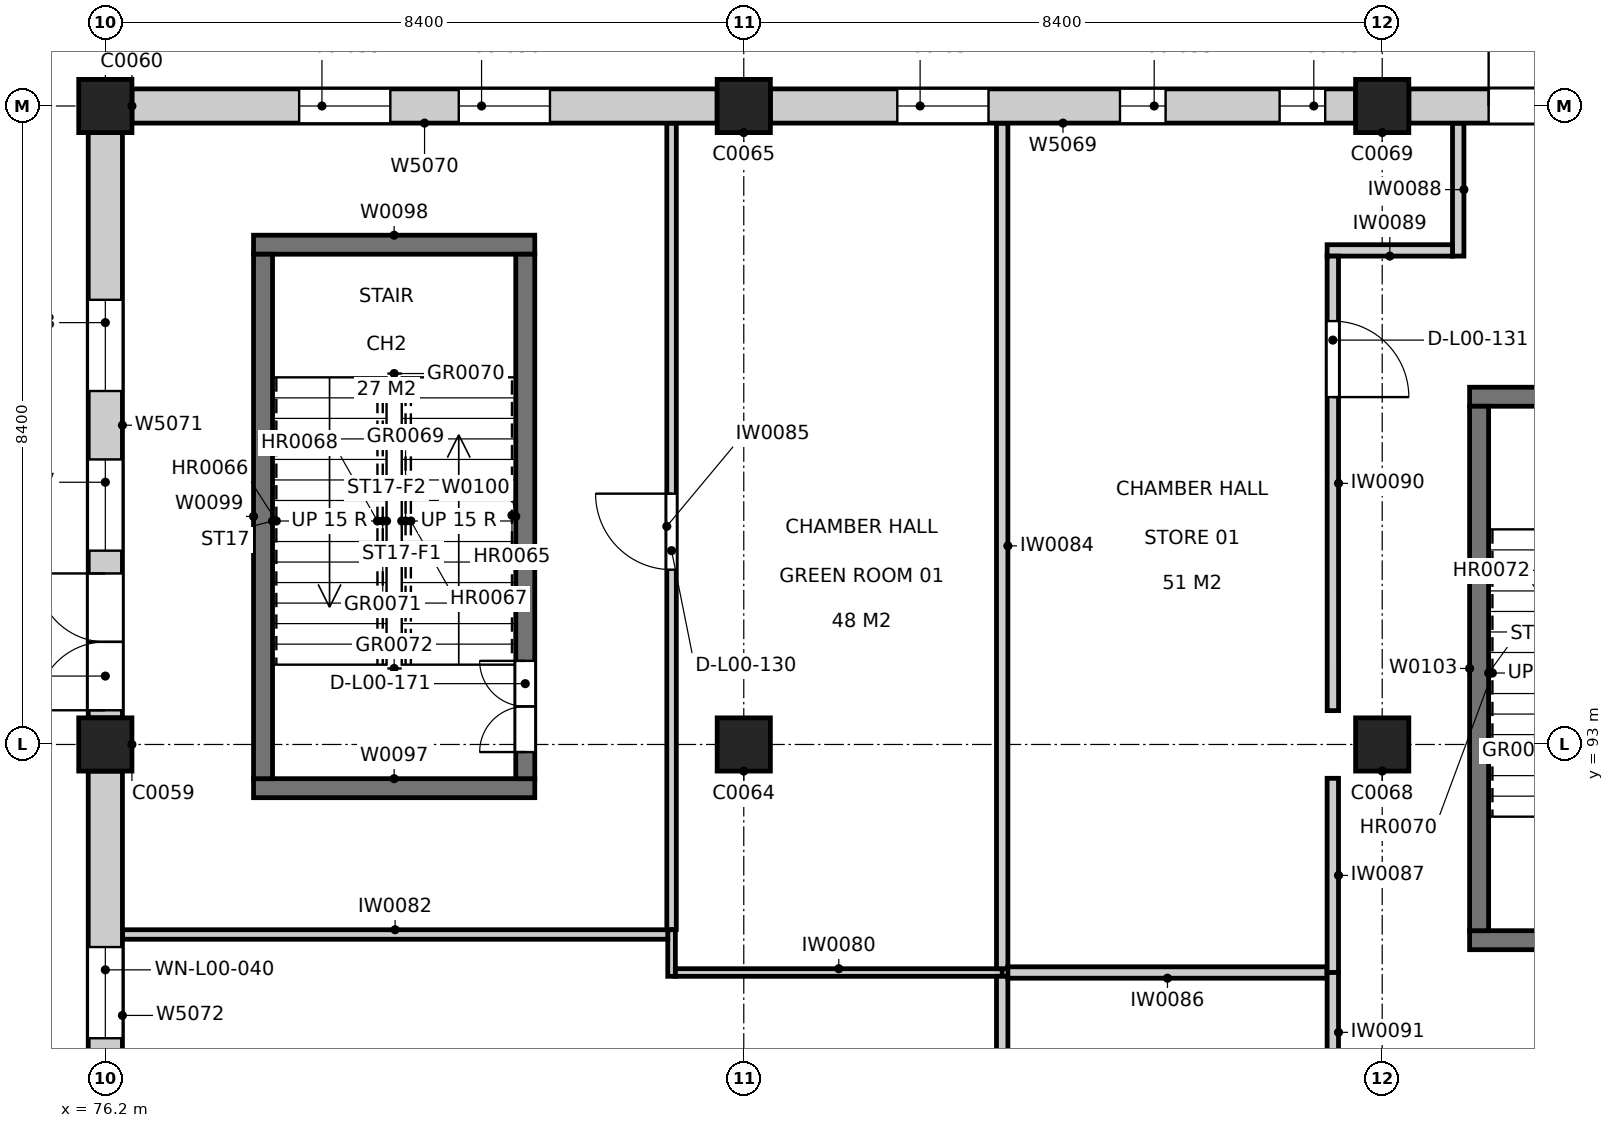
"""IFC4 building model, lengths in metres.
Left out: names, types, materials, properties, quantities, classifications, styles, units other than length and angle.
Written with IfcOpenShell. Run it as: python <this file> out.ifc"""

import sys

from ifc_helpers import new_model, si_unit, direction, frame, frame_2d, origin, origin_2d, place, context, subcontext, project, spatial, rectangle, extrude, element, fill, save


model = new_model("IFC4")
c1 = context("Model", 3, precision=1e-05, world=origin(), true_north=direction((0.0, 1.0)))
c2 = subcontext(c1, "Body", "Model", "MODEL_VIEW")
j1 = project(units=[si_unit("LENGTHUNIT", "METRE"), si_unit("PLANEANGLEUNIT", "RADIAN")], contexts=[c1])
p1 = place(None, origin())
s1 = spatial("IfcSite", under=j1, at=p1, CompositionType="ELEMENT")
p2 = place(p1, origin())
s2 = spatial("IfcBuilding", under=s1, at=p2, CompositionType="ELEMENT")
p3 = place(p2, origin())
s3 = spatial("IfcBuildingStorey", under=s2, at=p3, CompositionType="ELEMENT", Elevation=0.0)
for number, where, z_axis, x_axis in (
    (1, (76.2, 93.0, -0.4), (0.0, 0.0, 1.0), (1.0, 0.0, 0.0)),
    (2, (76.2, 101.4, -0.4), (0.0, 0.0, 1.0), (1.0, 0.0, 0.0)),
    (3, (84.6, 93.0, -0.4), (0.0, 0.0, 1.0), (1.0, 0.0, 0.0)),
    (4, (84.6, 101.4, -0.4), (0.0, 0.0, 1.0), (1.0, 0.0, 0.0)),
    (5, (93.0, 93.0, -0.4), (0.0, 0.0, 1.0), (1.0, 0.0, 0.0)),
    (6, (93.0, 101.4, -0.4), (0.0, 0.0, 1.0), (1.0, 0.0, 0.0)),
):
    element("IfcColumn", number, at=place(p3, frame(where, z_axis=z_axis, x_axis=x_axis)), inside=s3, PredefinedType="COLUMN", context=c2, shape_type="SweptSolid", body=[
        extrude(rectangle(XDim=0.7, YDim=0.7, at=origin_2d()), origin(), (0.0, 0.0, 1.0), 5.2),
    ])
for number, where, z_axis, x_axis in (
    (7, (78.15, 92.425, 0.0), (0.0, 0.0, 1.0), (1.0, 0.0, 0.0)),
    (8, (78.15, 99.575, 0.0), (0.0, 0.0, 1.0), (1.0, 0.0, 0.0)),
):
    element("IfcWall", number, at=place(p3, frame(where, z_axis=z_axis, x_axis=x_axis)), inside=s3, PredefinedType="SOLIDWALL", context=c2, shape_type="SweptSolid", body=[
        extrude(rectangle(XDim=3.7, YDim=0.25, at=frame_2d((1.85, 0.0))), origin(), (0.0, 0.0, 1.0), 4.8),
    ])
p4 = place(p3, frame((78.275, 92.55, 0.0), z_axis=(0.0, 0.0, 1.0), x_axis=(0.0, 1.0, 0.0)))
e9 = element("IfcWall", 9, at=p4, inside=s3, PredefinedType="SOLIDWALL", context=c2, shape_type="SweptSolid", body=[
    extrude(rectangle(XDim=6.9, YDim=0.25, at=frame_2d((3.45, 0.0))), origin(), (0.0, 0.0, 1.0), 4.8),
])
p5 = place(p3, frame((81.725, 92.55, 0.0), z_axis=(0.0, 0.0, 1.0), x_axis=(0.0, 1.0, 0.0)))
e10 = element("IfcWall", 10, at=p5, inside=s3, PredefinedType="SOLIDWALL", context=c2, shape_type="SweptSolid", body=[
    extrude(rectangle(XDim=6.9, YDim=0.25, at=frame_2d((3.45, 0.0))), origin(), (0.0, 0.0, 1.0), 4.8),
])
p6 = place(p5, frame((0.35, 0.0, 0.0)))
e11 = element("IfcOpeningElement", 11, at=p6, cuts=e10, PredefinedType="OPENING", context=c2, shape_type="SweptSolid", body=[
    extrude(rectangle(XDim=1.2, YDim=2.1, at=frame_2d((0.6, 1.05))), frame((0.0, 0.135, 0.0), z_axis=(0.0, -1.0, 0.0), x_axis=(1.0, 0.0, 0.0)), (0.0, 0.0, 1.0), 0.27),
])
for number, where, z_axis, x_axis in (
    (12, (94.15, 90.425, 0.0), (0.0, 0.0, 1.0), (1.0, 0.0, 0.0)),
    (13, (94.15, 97.575, 0.0), (0.0, 0.0, 1.0), (1.0, 0.0, 0.0)),
):
    element("IfcWall", number, at=place(p3, frame(where, z_axis=z_axis, x_axis=x_axis)), inside=s3, PredefinedType="SOLIDWALL", context=c2, shape_type="SweptSolid", body=[
        extrude(rectangle(XDim=3.7, YDim=0.25, at=frame_2d((1.85, 0.0))), origin(), (0.0, 0.0, 1.0), 4.8),
    ])
p7 = place(p3, frame((94.275, 90.55, 0.0), z_axis=(0.0, 0.0, 1.0), x_axis=(0.0, 1.0, 0.0)))
e14 = element("IfcWall", 14, at=p7, inside=s3, PredefinedType="SOLIDWALL", context=c2, shape_type="SweptSolid", body=[
    extrude(rectangle(XDim=6.9, YDim=0.25, at=frame_2d((3.45, 0.0))), origin(), (0.0, 0.0, 1.0), 4.8),
])
p8 = place(p3, frame((83.65, 90.562, 0.0), z_axis=(0.0, 0.0, 1.0), x_axis=(0.0, -1.0, 0.0)))
e15 = element("IfcWall", 15, at=p8, inside=s3, PredefinedType="PARTITIONING", context=c2, shape_type="SweptSolid", body=[
    extrude(rectangle(XDim=0.613, YDim=0.1, at=frame_2d((0.306, 0.0))), origin(), (0.0, 0.0, 1.0), 3.9),
])
p9 = place(p3, frame((83.7, 90.0, 0.0), z_axis=(0.0, 0.0, 1.0), x_axis=(1.0, 0.0, 0.0)))
e16 = element("IfcWall", 16, at=p9, inside=s3, PredefinedType="PARTITIONING", context=c2, shape_type="SweptSolid", body=[
    extrude(rectangle(XDim=4.3, YDim=0.1, at=frame_2d((2.15, 0.0))), origin(), (0.0, 0.0, 1.0), 3.8),
])
p10 = place(p3, frame((88.0, 89.95, 0.0), z_axis=(0.0, 0.0, 1.0), x_axis=(0.0, -1.0, 0.0)))
e17 = element("IfcWall", 17, at=p10, inside=s3, PredefinedType="PARTITIONING", context=c2, shape_type="SweptSolid", body=[
    extrude(rectangle(XDim=11.259, YDim=0.15, at=frame_2d((5.629, 0.0))), origin(), (0.0, 0.0, 1.0), 3.8),
])
p11 = place(p3, frame((76.425, 90.5, 0.0), z_axis=(0.0, 0.0, 1.0), x_axis=(1.0, 0.0, 0.0)))
e18 = element("IfcWall", 18, at=p11, inside=s3, PredefinedType="PARTITIONING", context=c2, shape_type="SweptSolid", body=[
    extrude(rectangle(XDim=7.175, YDim=0.125, at=frame_2d((3.587, 0.0))), origin(), (0.0, 0.0, 1.0), 4.6),
])
p12 = place(p3, frame((88.0, 101.175, 0.0), z_axis=(0.0, 0.0, 1.0), x_axis=(0.0, -1.0, 0.0)))
e19 = element("IfcWall", 19, at=p12, inside=s3, PredefinedType="PARTITIONING", context=c2, shape_type="SweptSolid", body=[
    extrude(rectangle(XDim=11.125, YDim=0.15, at=frame_2d((5.562, 0.0))), origin(), (0.0, 0.0, 1.0), 3.8),
])
p13 = place(p3, frame((83.65, 90.566, 0.0), z_axis=(0.0, 0.0, 1.0), x_axis=(0.0, 1.0, 0.0)))
e20 = element("IfcWall", 20, at=p13, inside=s3, PredefinedType="PARTITIONING", context=c2, shape_type="SweptSolid", body=[
    extrude(rectangle(XDim=10.609, YDim=0.125, at=frame_2d((5.304, 0.0))), origin(), (0.0, 0.0, 1.0), 3.8),
])
p14 = place(p13, frame((4.734, 0.0, 0.0)))
e21 = element("IfcOpeningElement", 21, at=p14, cuts=e20, PredefinedType="OPENING", context=c2, shape_type="SweptSolid", body=[
    extrude(rectangle(XDim=1.0, YDim=2.1, at=frame_2d((0.5, 1.05))), frame((0.0, 0.073, 0.0), z_axis=(0.0, -1.0, 0.0), x_axis=(1.0, 0.0, 0.0)), (0.0, 0.0, 1.0), 0.145),
])
p15 = place(p3, frame((92.275, 90.0, 0.0), z_axis=(0.0, 0.0, 1.0), x_axis=(-1.0, 0.0, 0.0)))
e22 = element("IfcWall", 22, at=p15, inside=s3, PredefinedType="PARTITIONING", context=c2, shape_type="SweptSolid", body=[
    extrude(rectangle(XDim=4.2, YDim=0.15, at=frame_2d((2.1, 0.0))), origin(), (0.0, 0.0, 1.0), 3.9),
])
p16 = place(p3, frame((92.35, 92.555, 0.0), z_axis=(0.0, 0.0, 1.0), x_axis=(0.0, -1.0, 0.0)))
e23 = element("IfcWall", 23, at=p16, inside=s3, PredefinedType="PARTITIONING", context=c2, shape_type="SweptSolid", body=[
    extrude(rectangle(XDim=2.555, YDim=0.15, at=frame_2d((1.277, 0.0))), origin(), (0.0, 0.0, 1.0), 3.9),
])
p17 = place(p3, frame((94.0, 101.175, 0.0), z_axis=(0.0, 0.0, 1.0), x_axis=(0.0, -1.0, 0.0)))
e24 = element("IfcWall", 24, at=p17, inside=s3, PredefinedType="PARTITIONING", context=c2, shape_type="SweptSolid", body=[
    extrude(rectangle(XDim=1.75, YDim=0.15, at=frame_2d((0.875, 0.0))), origin(), (0.0, 0.0, 1.0), 4.6),
])
p18 = place(p3, frame((93.925, 99.5, 0.0), z_axis=(0.0, 0.0, 1.0), x_axis=(-1.0, 0.0, 0.0)))
e25 = element("IfcWall", 25, at=p18, inside=s3, PredefinedType="PARTITIONING", context=c2, shape_type="SweptSolid", body=[
    extrude(rectangle(XDim=1.65, YDim=0.15, at=frame_2d((0.825, 0.0))), origin(), (0.0, 0.0, 1.0), 3.8),
])
p19 = place(p3, frame((92.35, 99.425, 0.0), z_axis=(0.0, 0.0, 1.0), x_axis=(0.000163305297, -0.999999986666, 0.0)))
e26 = element("IfcWall", 26, at=p19, inside=s3, PredefinedType="PARTITIONING", context=c2, shape_type="SweptSolid", body=[
    extrude(rectangle(XDim=5.98, YDim=0.15, at=frame_2d((2.99, 0.0))), origin(), (0.0, 0.0, 1.0), 3.9),
])
p20 = place(p19, frame((0.855, 0.0, 0.0)))
e27 = element("IfcOpeningElement", 27, at=p20, cuts=e26, PredefinedType="OPENING", context=c2, shape_type="SweptSolid", body=[
    extrude(rectangle(XDim=1.0, YDim=2.1, at=frame_2d((0.5, 1.05))), frame((0.0, 0.085, 0.0), z_axis=(0.0, -1.0, 0.0), x_axis=(1.0, 0.0, 0.0)), (0.0, 0.0, 1.0), 0.17),
])
p21 = place(p3, frame((92.35, 90.0, 0.0), z_axis=(0.0, 0.0, 1.0), x_axis=(0.0, -1.0, 0.0)))
e28 = element("IfcWall", 28, at=p21, inside=s3, PredefinedType="PARTITIONING", context=c2, shape_type="SweptSolid", body=[
    extrude(rectangle(XDim=1.575, YDim=0.15, at=frame_2d((0.788, 0.0))), origin(), (0.0, 0.0, 1.0), 4.6),
])
p22 = place(p3, frame((101.05, 101.4, 0.0), z_axis=(0.0, 0.0, 1.0), x_axis=(-1.0, 0.0, 0.0)))
e29 = element("IfcWall", 29, at=p22, inside=s3, PredefinedType="SOLIDWALL", context=c2, shape_type="SweptSolid", body=[
    extrude(rectangle(XDim=7.7, YDim=0.45, at=frame_2d((3.85, 0.0))), origin(), (0.0, 0.0, 1.0), 3.8),
])
p23 = place(p22, frame((6.65, 0.0, 0.0), z_axis=(0.0, 0.0, 1.0), x_axis=(-1.0, 0.0, 0.0)))
e30 = element("IfcOpeningElement", 30, at=p23, cuts=e29, PredefinedType="OPENING", context=c2, shape_type="SweptSolid", body=[
    extrude(rectangle(XDim=1.2, YDim=2.4, at=frame_2d((0.6, 1.2))), frame((0.0, 0.235, 0.0), z_axis=(0.0, -1.0, 0.0), x_axis=(1.0, 0.0, 0.0)), (0.0, 0.0, 1.0), 0.47),
])
p24 = place(p22, frame((4.75, 0.0, 0.0), z_axis=(0.0, 0.0, 1.0), x_axis=(-1.0, 0.0, 0.0)))
e31 = element("IfcOpeningElement", 31, at=p24, cuts=e29, PredefinedType="OPENING", context=c2, shape_type="SweptSolid", body=[
    extrude(rectangle(XDim=1.8, YDim=2.1, at=frame_2d((0.9, 1.05))), frame((0.0, 0.235, 0.0), z_axis=(0.0, -1.0, 0.0), x_axis=(1.0, 0.0, 0.0)), (0.0, 0.0, 1.0), 0.47),
])
p25 = place(p3, frame((92.65, 101.4, 0.0), z_axis=(0.0, 0.0, 1.0), x_axis=(-1.0, 0.0, 0.0)))
e32 = element("IfcWall", 32, at=p25, inside=s3, PredefinedType="SOLIDWALL", context=c2, shape_type="SweptSolid", body=[
    extrude(rectangle(XDim=7.7, YDim=0.45, at=frame_2d((3.85, 0.0))), origin(), (0.0, 0.0, 1.0), 3.8),
])
p26 = place(p25, frame((4.83, 0.0, 0.9)))
e33 = element("IfcOpeningElement", 33, at=p26, cuts=e32, PredefinedType="OPENING", context=c2, shape_type="SweptSolid", body=[
    extrude(rectangle(XDim=1.2, YDim=2.4, at=frame_2d((0.6, 1.2))), frame((0.0, 0.235, 0.0), z_axis=(0.0, -1.0, 0.0), x_axis=(1.0, 0.0, 0.0)), (0.0, 0.0, 1.0), 0.47),
])
p27 = place(p25, frame((2.5, 0.0, 2.1)))
e34 = element("IfcOpeningElement", 34, at=p27, cuts=e32, PredefinedType="OPENING", context=c2, shape_type="SweptSolid", body=[
    extrude(rectangle(XDim=0.6, YDim=0.9, at=frame_2d((0.3, 0.45))), frame((0.0, 0.235, 0.0), z_axis=(0.0, -1.0, 0.0), x_axis=(1.0, 0.0, 0.0)), (0.0, 0.0, 1.0), 0.47),
])
p28 = place(p25, frame((0.4, 0.0, 2.1)))
e35 = element("IfcOpeningElement", 35, at=p28, cuts=e32, PredefinedType="OPENING", context=c2, shape_type="SweptSolid", body=[
    extrude(rectangle(XDim=0.6, YDim=0.9, at=frame_2d((0.3, 0.45))), frame((0.0, 0.235, 0.0), z_axis=(0.0, -1.0, 0.0), x_axis=(1.0, 0.0, 0.0)), (0.0, 0.0, 1.0), 0.47),
])
p29 = place(p3, frame((84.25, 101.4, 0.0), z_axis=(0.0, 0.0, 1.0), x_axis=(-1.0, 0.0, 0.0)))
e36 = element("IfcWall", 36, at=p29, inside=s3, PredefinedType="SOLIDWALL", context=c2, shape_type="SweptSolid", body=[
    extrude(rectangle(XDim=7.7, YDim=0.45, at=frame_2d((3.85, 0.0))), origin(), (0.0, 0.0, 1.0), 3.8),
])
p30 = place(p29, frame((4.3, 0.0, 0.9)))
e37 = element("IfcOpeningElement", 37, at=p30, cuts=e36, PredefinedType="OPENING", context=c2, shape_type="SweptSolid", body=[
    extrude(rectangle(XDim=1.2, YDim=2.4, at=frame_2d((0.6, 1.2))), frame((0.0, 0.235, 0.0), z_axis=(0.0, -1.0, 0.0), x_axis=(1.0, 0.0, 0.0)), (0.0, 0.0, 1.0), 0.47),
])
p31 = place(p29, frame((2.2, 0.0, 0.9)))
e38 = element("IfcOpeningElement", 38, at=p31, cuts=e36, PredefinedType="OPENING", context=c2, shape_type="SweptSolid", body=[
    extrude(rectangle(XDim=1.2, YDim=2.4, at=frame_2d((0.6, 1.2))), frame((0.0, 0.235, 0.0), z_axis=(0.0, -1.0, 0.0), x_axis=(1.0, 0.0, 0.0)), (0.0, 0.0, 1.0), 0.47),
])
p32 = place(p3, frame((76.2, 101.05, 0.0), z_axis=(0.0, 0.0, 1.0), x_axis=(0.0, -1.0, 0.0)))
e39 = element("IfcWall", 39, at=p32, inside=s3, PredefinedType="SOLIDWALL", context=c2, shape_type="SweptSolid", body=[
    extrude(rectangle(XDim=7.7, YDim=0.45, at=frame_2d((3.85, 0.0))), origin(), (0.0, 0.0, 1.0), 3.8),
])
p33 = place(p32, frame((7.6, 0.0, 0.0), z_axis=(0.0, 0.0, 1.0), x_axis=(-1.0, 0.0, 0.0)))
e40 = element("IfcOpeningElement", 40, at=p33, cuts=e39, PredefinedType="OPENING", context=c2, shape_type="SweptSolid", body=[
    extrude(rectangle(XDim=1.8, YDim=2.1, at=frame_2d((0.9, 1.05))), frame((0.0, 0.235, 0.0), z_axis=(0.0, -1.0, 0.0), x_axis=(1.0, 0.0, 0.0)), (0.0, 0.0, 1.0), 0.47),
])
p34 = place(p32, frame((4.3, 0.0, 0.9)))
e41 = element("IfcOpeningElement", 41, at=p34, cuts=e39, PredefinedType="OPENING", context=c2, shape_type="SweptSolid", body=[
    extrude(rectangle(XDim=1.2, YDim=2.4, at=frame_2d((0.6, 1.2))), frame((0.0, 0.235, 0.0), z_axis=(0.0, -1.0, 0.0), x_axis=(1.0, 0.0, 0.0)), (0.0, 0.0, 1.0), 0.47),
])
p35 = place(p32, frame((2.2, 0.0, 0.9)))
e42 = element("IfcOpeningElement", 42, at=p35, cuts=e39, PredefinedType="OPENING", context=c2, shape_type="SweptSolid", body=[
    extrude(rectangle(XDim=1.2, YDim=2.4, at=frame_2d((0.6, 1.2))), frame((0.0, 0.235, 0.0), z_axis=(0.0, -1.0, 0.0), x_axis=(1.0, 0.0, 0.0)), (0.0, 0.0, 1.0), 0.47),
])
p36 = place(p3, frame((76.2, 92.65, 0.0), z_axis=(0.0, 0.0, 1.0), x_axis=(0.0, -1.0, 0.0)))
e43 = element("IfcWall", 43, at=p36, inside=s3, PredefinedType="SOLIDWALL", context=c2, shape_type="SweptSolid", body=[
    extrude(rectangle(XDim=7.7, YDim=0.45, at=frame_2d((3.85, 0.0))), origin(), (0.0, 0.0, 1.0), 3.8),
])
p37 = place(p36, frame((4.3, 0.0, 0.9)))
e44 = element("IfcOpeningElement", 44, at=p37, cuts=e43, PredefinedType="OPENING", context=c2, shape_type="SweptSolid", body=[
    extrude(rectangle(XDim=1.2, YDim=2.4, at=frame_2d((0.6, 1.2))), frame((0.0, 0.235, 0.0), z_axis=(0.0, -1.0, 0.0), x_axis=(1.0, 0.0, 0.0)), (0.0, 0.0, 1.0), 0.47),
])
p38 = place(p36, frame((2.315, 0.0, 0.9)))
e45 = element("IfcOpeningElement", 45, at=p38, cuts=e43, PredefinedType="OPENING", context=c2, shape_type="SweptSolid", body=[
    extrude(rectangle(XDim=1.2, YDim=2.4, at=frame_2d((0.6, 1.2))), frame((0.0, 0.235, 0.0), z_axis=(0.0, -1.0, 0.0), x_axis=(1.0, 0.0, 0.0)), (0.0, 0.0, 1.0), 0.47),
])
p39 = place(p14, origin())
e46 = element("IfcDoor", 46, at=p39, inside=s3, OperationType="SINGLE_SWING_RIGHT", PredefinedType="DOOR", context=c2, shape_type="SweptSolid", body=[
    extrude(rectangle(XDim=1.0, YDim=2.1, at=frame_2d((0.5, 1.05))), frame((0.0, 0.025, 0.0), z_axis=(0.0, -1.0, 0.0), x_axis=(1.0, 0.0, 0.0)), (0.0, 0.0, 1.0), 0.05),
])
fill(e21, e46)
p40 = place(p20, origin())
e47 = element("IfcDoor", 47, at=p40, inside=s3, OperationType="SINGLE_SWING_RIGHT", PredefinedType="DOOR", context=c2, shape_type="SweptSolid", body=[
    extrude(rectangle(XDim=1.0, YDim=2.1, at=frame_2d((0.5, 1.05))), frame((0.0, 0.025, 0.0), z_axis=(0.0, -1.0, 0.0), x_axis=(1.0, 0.0, 0.0)), (0.0, 0.0, 1.0), 0.05),
])
fill(e27, e47)
p41 = place(p6, origin())
e48 = element("IfcDoor", 48, at=p41, inside=s3, OperationType="DOUBLE_DOOR_SINGLE_SWING", PredefinedType="DOOR", context=c2, shape_type="SweptSolid", body=[
    extrude(rectangle(XDim=1.2, YDim=2.1, at=frame_2d((0.6, 1.05))), frame((0.0, 0.025, 0.0), z_axis=(0.0, -1.0, 0.0), x_axis=(1.0, 0.0, 0.0)), (0.0, 0.0, 1.0), 0.05),
])
fill(e11, e48)
p42 = place(p33, origin())
e49 = element("IfcDoor", 49, at=p42, inside=s3, OperationType="DOUBLE_DOOR_SINGLE_SWING", PredefinedType="DOOR", context=c2, shape_type="SweptSolid", body=[
    extrude(rectangle(XDim=1.8, YDim=2.1, at=frame_2d((0.9, 1.05))), frame((0.0, 0.025, 0.0), z_axis=(0.0, -1.0, 0.0), x_axis=(1.0, 0.0, 0.0)), (0.0, 0.0, 1.0), 0.05),
])
fill(e40, e49)
p43 = place(p23, origin())
e50 = element("IfcDoor", 50, at=p43, inside=s3, OperationType="SINGLE_SWING_LEFT", PredefinedType="DOOR", context=c2, shape_type="SweptSolid", body=[
    extrude(rectangle(XDim=1.2, YDim=2.4, at=frame_2d((0.6, 1.2))), frame((0.0, 0.025, 0.0), z_axis=(0.0, -1.0, 0.0), x_axis=(1.0, 0.0, 0.0)), (0.0, 0.0, 1.0), 0.05),
])
fill(e30, e50)
p44 = place(p26, origin())
e51 = element("IfcWindow", 51, at=p44, inside=s3, PartitioningType="SINGLE_PANEL", PredefinedType="WINDOW", context=c2, shape_type="SweptSolid", body=[
    extrude(rectangle(XDim=1.2, YDim=2.4, at=frame_2d((0.6, 1.2))), frame((0.0, 0.135, 0.0), z_axis=(0.0, -1.0, 0.0), x_axis=(1.0, 0.0, 0.0)), (0.0, 0.0, 1.0), 0.06),
])
fill(e33, e51)
p45 = place(p27, origin())
e52 = element("IfcWindow", 52, at=p45, inside=s3, PartitioningType="SINGLE_PANEL", PredefinedType="WINDOW", context=c2, shape_type="SweptSolid", body=[
    extrude(rectangle(XDim=0.6, YDim=0.9, at=frame_2d((0.3, 0.45))), frame((0.0, 0.035, 0.0), z_axis=(0.0, -1.0, 0.0), x_axis=(1.0, 0.0, 0.0)), (0.0, 0.0, 1.0), 0.06),
])
fill(e34, e52)
p46 = place(p28, origin())
e53 = element("IfcWindow", 53, at=p46, inside=s3, PartitioningType="SINGLE_PANEL", PredefinedType="WINDOW", context=c2, shape_type="SweptSolid", body=[
    extrude(rectangle(XDim=0.6, YDim=0.9, at=frame_2d((0.3, 0.45))), frame((0.0, 0.035, 0.0), z_axis=(0.0, -1.0, 0.0), x_axis=(1.0, 0.0, 0.0)), (0.0, 0.0, 1.0), 0.06),
])
fill(e35, e53)
p47 = place(p30, origin())
e54 = element("IfcWindow", 54, at=p47, inside=s3, PartitioningType="SINGLE_PANEL", PredefinedType="WINDOW", context=c2, shape_type="SweptSolid", body=[
    extrude(rectangle(XDim=1.2, YDim=2.4, at=frame_2d((0.6, 1.2))), frame((0.0, 0.135, 0.0), z_axis=(0.0, -1.0, 0.0), x_axis=(1.0, 0.0, 0.0)), (0.0, 0.0, 1.0), 0.06),
])
fill(e37, e54)
p48 = place(p31, origin())
e55 = element("IfcWindow", 55, at=p48, inside=s3, PartitioningType="SINGLE_PANEL", PredefinedType="WINDOW", context=c2, shape_type="SweptSolid", body=[
    extrude(rectangle(XDim=1.2, YDim=2.4, at=frame_2d((0.6, 1.2))), frame((0.0, 0.135, 0.0), z_axis=(0.0, -1.0, 0.0), x_axis=(1.0, 0.0, 0.0)), (0.0, 0.0, 1.0), 0.06),
])
fill(e38, e55)
p49 = place(p34, origin())
e56 = element("IfcWindow", 56, at=p49, inside=s3, PartitioningType="SINGLE_PANEL", PredefinedType="WINDOW", context=c2, shape_type="SweptSolid", body=[
    extrude(rectangle(XDim=1.2, YDim=2.4, at=frame_2d((0.6, 1.2))), frame((0.0, 0.135, 0.0), z_axis=(0.0, -1.0, 0.0), x_axis=(1.0, 0.0, 0.0)), (0.0, 0.0, 1.0), 0.06),
])
fill(e41, e56)
p50 = place(p35, origin())
e57 = element("IfcWindow", 57, at=p50, inside=s3, PartitioningType="SINGLE_PANEL", PredefinedType="WINDOW", context=c2, shape_type="SweptSolid", body=[
    extrude(rectangle(XDim=1.2, YDim=2.4, at=frame_2d((0.6, 1.2))), frame((0.0, 0.135, 0.0), z_axis=(0.0, -1.0, 0.0), x_axis=(1.0, 0.0, 0.0)), (0.0, 0.0, 1.0), 0.06),
])
fill(e42, e57)
p51 = place(p38, origin())
e58 = element("IfcWindow", 58, at=p51, inside=s3, PartitioningType="SINGLE_PANEL", PredefinedType="WINDOW", context=c2, shape_type="SweptSolid", body=[
    extrude(rectangle(XDim=1.2, YDim=2.4, at=frame_2d((0.6, 1.2))), frame((0.0, 0.135, 0.0), z_axis=(0.0, -1.0, 0.0), x_axis=(1.0, 0.0, 0.0)), (0.0, 0.0, 1.0), 0.06),
])
fill(e45, e58)
save(model, sys.argv[1])
